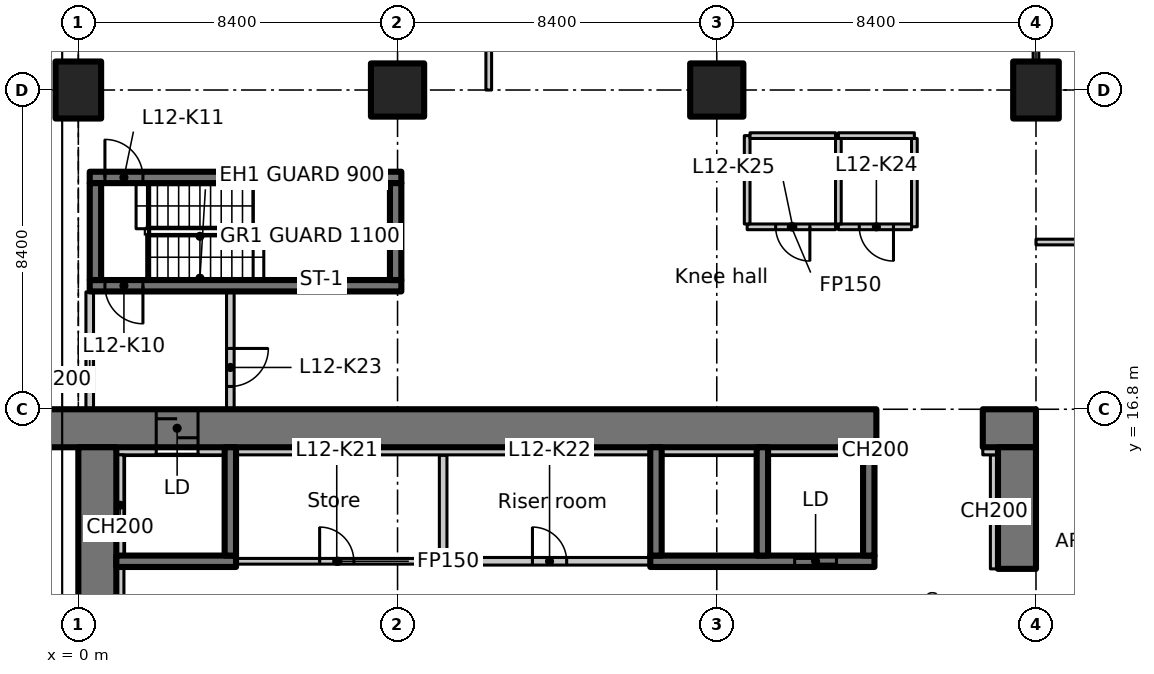
"""IFC4 building model, lengths in metres.
Left out: names, types, materials, properties, quantities, classifications, styles, units other than length and angle.
Written with IfcOpenShell. Run it as: python <this file> out.ifc"""

import sys

from ifc_helpers import new_model, si_unit, direction, frame, frame_2d, origin, origin_2d, place, context, subcontext, project, spatial, polyline, rectangle, outline, extrude, element, fill, save


model = new_model("IFC4")
c1 = context("Model", 3, precision=1e-05, world=origin(), true_north=direction((0.0, 1.0)))
c2 = subcontext(c1, "Body", "Model", "MODEL_VIEW")
j1 = project(units=[si_unit("LENGTHUNIT", "METRE"), si_unit("PLANEANGLEUNIT", "RADIAN")], contexts=[c1])
p1 = place(None, origin())
s1 = spatial("IfcSite", under=j1, at=p1, CompositionType="ELEMENT")
p2 = place(p1, origin())
s2 = spatial("IfcBuilding", under=s1, at=p2, CompositionType="ELEMENT")
p3 = place(p2, frame((0.0, 0.0, 58.1)))
s3 = spatial("IfcBuildingStorey", under=s2, at=p3, CompositionType="ELEMENT", Elevation=58.1)
p4 = place(p3, frame((0.0, 25.2, 0.0), z_axis=(0.0, 0.0, 1.0), x_axis=(1.0, 0.0, 0.0)))
e1 = element("IfcColumn", 1, at=p4, inside=s3, PredefinedType="COLUMN", context=c2, shape_type="SweptSolid", body=[
    extrude(rectangle(XDim=1.2, YDim=1.5, at=origin_2d()), origin(), (0.0, 0.0, 1.0), 3.35),
])
for number, where, z_axis, x_axis in (
    (2, (8.4, 25.2, 0.0), (0.0, 0.0, 1.0), (1.0, 0.0, 0.0)),
    (3, (16.8, 25.2, 0.0), (0.0, 0.0, 1.0), (1.0, 0.0, 0.0)),
):
    element("IfcColumn", number, at=place(p3, frame(where, z_axis=z_axis, x_axis=x_axis)), inside=s3, PredefinedType="COLUMN", context=c2, shape_type="SweptSolid", body=[
        extrude(rectangle(XDim=1.4, YDim=1.4, at=origin_2d()), origin(), (0.0, 0.0, 1.0), 3.35),
    ])
p5 = place(p3, frame((25.2, 25.2, 0.0), z_axis=(0.0, 0.0, 1.0), x_axis=(1.0, 0.0, 0.0)))
e4 = element("IfcColumn", 4, at=p5, inside=s3, PredefinedType="COLUMN", context=c2, shape_type="SweptSolid", body=[
    extrude(rectangle(XDim=1.2, YDim=1.5, at=origin_2d()), origin(), (0.0, 0.0, 1.0), 3.35),
])
p6 = place(p3, frame((-1.1, 16.3, 0.0), z_axis=(0.0, 0.0, 1.0), x_axis=(1.0, 0.0, 0.0)))
e5 = element("IfcWall", 5, at=p6, inside=s3, PredefinedType="SHEAR", context=c2, shape_type="SweptSolid", body=[
    extrude(rectangle(XDim=22.1, YDim=1.0, at=frame_2d((11.05, 0.0))), origin(), (0.0, 0.0, 1.0), 3.35),
])
p7 = place(p6, frame((3.15, 0.0, 0.0)))
e6 = element("IfcOpeningElement", 6, at=p7, cuts=e5, PredefinedType="OPENING", context=c2, shape_type="SweptSolid", body=[
    extrude(rectangle(XDim=1.1, YDim=2.3, at=frame_2d((0.55, 1.15))), frame((0.0, 0.51, 0.0), z_axis=(0.0, -1.0, 0.0), x_axis=(1.0, 0.0, 0.0)), (0.0, 0.0, 1.0), 1.02),
])
p8 = place(p3, frame((23.8, 16.3, 0.0), z_axis=(0.0, 0.0, 1.0), x_axis=(1.0, 0.0, 0.0)))
e7 = element("IfcWall", 7, at=p8, inside=s3, PredefinedType="SHEAR", context=c2, shape_type="SweptSolid", body=[
    extrude(rectangle(XDim=1.4, YDim=1.0, at=frame_2d((0.7, 0.0))), origin(), (0.0, 0.0, 1.0), 3.35),
])
p9 = place(p3, frame((0.5, 6.936, 0.0), z_axis=(0.0, 0.0, 1.0), x_axis=(0.0, 1.0, 0.0)))
e8 = element("IfcWall", 8, at=p9, inside=s3, PredefinedType="SHEAR", context=c2, shape_type="SweptSolid", body=[
    extrude(rectangle(XDim=8.864, YDim=1.0, at=frame_2d((4.432, 0.0))), origin(), (0.0, 0.0, 1.0), 3.35),
])
p10 = place(p3, frame((24.7, 12.6, 0.0), z_axis=(0.0, 0.0, 1.0), x_axis=(0.0, 1.0, 0.0)))
e9 = element("IfcWall", 9, at=p10, inside=s3, PredefinedType="SHEAR", context=c2, shape_type="SweptSolid", body=[
    extrude(rectangle(XDim=3.2, YDim=1.0, at=frame_2d((1.6, 0.0))), origin(), (0.0, 0.0, 1.0), 3.35),
])
p11 = place(p3, frame((24.1, 12.6, 0.0), z_axis=(0.0, 0.0, 1.0), x_axis=(0.0, 1.0, 0.0)))
e10 = element("IfcWall", 10, at=p11, inside=s3, PredefinedType="PARTITIONING", context=c2, shape_type="SweptSolid", body=[
    extrude(rectangle(XDim=3.0, YDim=0.2, at=frame_2d((1.5, 0.0))), origin(), (0.0, 0.0, 1.0), 3.35),
])
p12 = place(p3, frame((1.0, 15.7, 0.0), z_axis=(0.0, 0.0, 1.0), x_axis=(1.0, 0.0, 0.0)))
e11 = element("IfcWall", 11, at=p12, inside=s3, PredefinedType="PARTITIONING", context=c2, shape_type="SweptSolid", body=[
    extrude(rectangle(XDim=1.05, YDim=0.2, at=frame_2d((0.525, 0.0))), origin(), (0.0, 0.0, 1.0), 3.35),
])
p13 = place(p3, frame((23.8, 15.7, 0.0), z_axis=(0.0, 0.0, 1.0), x_axis=(1.0, 0.0, 0.0)))
e12 = element("IfcWall", 12, at=p13, inside=s3, PredefinedType="PARTITIONING", context=c2, shape_type="SweptSolid", body=[
    extrude(rectangle(XDim=0.4, YDim=0.2, at=frame_2d((0.2, 0.0))), origin(), (0.0, 0.0, 1.0), 3.35),
])
p14 = place(p3, frame((1.0, 12.8, 0.0), z_axis=(0.0, 0.0, 1.0), x_axis=(1.0, 0.0, 0.0)))
e13 = element("IfcWall", 13, at=p14, inside=s3, PredefinedType="SHEAR", context=c2, shape_type="SweptSolid", body=[
    extrude(rectangle(XDim=3.15, YDim=0.3, at=frame_2d((1.575, 0.0))), origin(), (0.0, 0.0, 1.0), 3.35),
])
p15 = place(p3, frame((4.0, 12.95, 0.0), z_axis=(0.0, 0.0, 1.0), x_axis=(0.0, 1.0, 0.0)))
e14 = element("IfcWall", 14, at=p15, inside=s3, PredefinedType="SHEAR", context=c2, shape_type="SweptSolid", body=[
    extrude(rectangle(XDim=2.85, YDim=0.3, at=frame_2d((1.425, 0.0))), origin(), (0.0, 0.0, 1.0), 3.35),
])
p16 = place(p3, frame((15.05, 12.8, 0.0), z_axis=(0.0, 0.0, 1.0), x_axis=(1.0, 0.0, 0.0)))
e15 = element("IfcWall", 15, at=p16, inside=s3, PredefinedType="SHEAR", context=c2, shape_type="SweptSolid", body=[
    extrude(rectangle(XDim=5.9, YDim=0.3, at=frame_2d((2.95, 0.0))), origin(), (0.0, 0.0, 1.0), 3.35),
])
p17 = place(p16, frame((3.8, 0.0, 0.0)))
e16 = element("IfcOpeningElement", 16, at=p17, cuts=e15, PredefinedType="OPENING", context=c2, shape_type="SweptSolid", body=[
    extrude(rectangle(XDim=1.1, YDim=2.3, at=frame_2d((0.55, 1.15))), frame((0.0, 0.16, 0.0), z_axis=(0.0, -1.0, 0.0), x_axis=(1.0, 0.0, 0.0)), (0.0, 0.0, 1.0), 0.32),
])
for number, where, z_axis, x_axis in (
    (17, (15.2, 12.95, 0.0), (0.0, 0.0, 1.0), (0.0, 1.0, 0.0)),
    (18, (18.0, 12.95, 0.0), (0.0, 0.0, 1.0), (0.0, 1.0, 0.0)),
    (19, (20.8, 12.95, 0.0), (0.0, 0.0, 1.0), (0.0, 1.0, 0.0)),
):
    element("IfcWall", number, at=place(p3, frame(where, z_axis=z_axis, x_axis=x_axis)), inside=s3, PredefinedType="SHEAR", context=c2, shape_type="SweptSolid", body=[
        extrude(rectangle(XDim=2.85, YDim=0.3, at=frame_2d((1.425, 0.0))), origin(), (0.0, 0.0, 1.0), 3.35),
    ])
p18 = place(p3, frame((8.5, 20.05, 0.0), z_axis=(0.0, 0.0, 1.0), x_axis=(-1.0, 0.0, 0.0)))
e20 = element("IfcWall", 20, at=p18, inside=s3, PredefinedType="SHEAR", context=c2, shape_type="SweptSolid", body=[
    extrude(rectangle(XDim=8.2, YDim=0.3, at=frame_2d((4.1, 0.0))), origin(), (0.0, 0.0, 1.0), 3.35),
])
p19 = place(p18, frame((6.8, 0.0, 0.0)))
e21 = element("IfcOpeningElement", 21, at=p19, cuts=e20, PredefinedType="OPENING", context=c2, shape_type="SweptSolid", body=[
    extrude(rectangle(XDim=1.0, YDim=2.1, at=frame_2d((0.5, 1.05))), frame((0.0, 0.16, 0.0), z_axis=(0.0, -1.0, 0.0), x_axis=(1.0, 0.0, 0.0)), (0.0, 0.0, 1.0), 0.32),
])
p20 = place(p3, frame((0.3, 22.9, 0.0), z_axis=(0.0, 0.0, 1.0), x_axis=(1.0, 0.0, 0.0)))
e22 = element("IfcWall", 22, at=p20, inside=s3, PredefinedType="SHEAR", context=c2, shape_type="SweptSolid", body=[
    extrude(rectangle(XDim=8.2, YDim=0.3, at=frame_2d((4.1, 0.0))), origin(), (0.0, 0.0, 1.0), 3.35),
])
p21 = place(p20, frame((0.4, 0.0, 0.0)))
e23 = element("IfcOpeningElement", 23, at=p21, cuts=e22, PredefinedType="OPENING", context=c2, shape_type="SweptSolid", body=[
    extrude(rectangle(XDim=1.0, YDim=2.1, at=frame_2d((0.5, 1.05))), frame((0.0, 0.16, 0.0), z_axis=(0.0, -1.0, 0.0), x_axis=(1.0, 0.0, 0.0)), (0.0, 0.0, 1.0), 0.32),
])
for number, where, z_axis, x_axis in (
    (24, (0.45, 20.2, 0.0), (0.0, 0.0, 1.0), (0.0, 1.0, 0.0)),
    (25, (8.35, 20.2, 0.0), (0.0, 0.0, 1.0), (0.0, 1.0, 0.0)),
):
    element("IfcWall", number, at=place(p3, frame(where, z_axis=z_axis, x_axis=x_axis)), inside=s3, PredefinedType="SHEAR", context=c2, shape_type="SweptSolid", body=[
        extrude(rectangle(XDim=2.55, YDim=0.3, at=frame_2d((1.275, 0.0))), origin(), (0.0, 0.0, 1.0), 3.35),
    ])
p22 = place(p3, frame((0.3, 16.812, 0.0), z_axis=(0.0, 0.0, 1.0), x_axis=(0.0, 1.0, 0.0)))
e26 = element("IfcWall", 26, at=p22, inside=s3, PredefinedType="PARTITIONING", context=c2, shape_type="SweptSolid", body=[
    extrude(rectangle(XDim=3.076, YDim=0.2, at=frame_2d((1.538, 0.0))), origin(), (0.0, 0.0, 1.0), 2.98),
])
p23 = place(p3, frame((4.0, 19.888, 0.0), z_axis=(0.0, 0.0, 1.0), x_axis=(0.0, -1.0, 0.0)))
e27 = element("IfcWall", 27, at=p23, inside=s3, PredefinedType="PARTITIONING", context=c2, shape_type="SweptSolid", body=[
    extrude(rectangle(XDim=3.076, YDim=0.2, at=frame_2d((1.538, 0.0))), origin(), (0.0, 0.0, 1.0), 3.35),
])
p24 = place(p23, frame((1.488, 0.0, 0.0)))
e28 = element("IfcOpeningElement", 28, at=p24, cuts=e27, PredefinedType="OPENING", context=c2, shape_type="SweptSolid", body=[
    extrude(rectangle(XDim=1.0, YDim=2.1, at=frame_2d((0.5, 1.05))), frame((0.0, 0.11, 0.0), z_axis=(0.0, -1.0, 0.0), x_axis=(1.0, 0.0, 0.0)), (0.0, 0.0, 1.0), 0.22),
])
p25 = place(p3, frame((9.6, 15.588, 0.0), z_axis=(0.0, 0.0, 1.0), x_axis=(0.0, -1.0, 0.0)))
e29 = element("IfcWall", 29, at=p25, inside=s3, PredefinedType="PARTITIONING", context=c2, shape_type="SweptSolid", body=[
    extrude(rectangle(XDim=2.788, YDim=0.2, at=frame_2d((1.394, 0.0))), origin(), (0.0, 0.0, 1.0), 3.35),
])
p26 = place(p3, frame((9.7, 12.8, 0.0), z_axis=(0.0, 0.0, 1.0), x_axis=(1.0, 0.0, 0.0)))
e30 = element("IfcWall", 30, at=p26, inside=s3, PredefinedType="PARTITIONING", context=c2, shape_type="SweptSolid", body=[
    extrude(rectangle(XDim=5.338, YDim=0.2, at=frame_2d((2.669, 0.0))), origin(), (0.0, 0.0, 1.0), 3.35),
])
p27 = place(p26, frame((2.25, 0.0, 0.0)))
e31 = element("IfcOpeningElement", 31, at=p27, cuts=e30, PredefinedType="OPENING", context=c2, shape_type="SweptSolid", body=[
    extrude(rectangle(XDim=0.9, YDim=2.1, at=frame_2d((0.45, 1.05))), frame((0.0, 0.11, 0.0), z_axis=(0.0, -1.0, 0.0), x_axis=(1.0, 0.0, 0.0)), (0.0, 0.0, 1.0), 0.22),
])
p28 = place(p3, frame((4.162, 12.8, 0.0), z_axis=(0.0, 0.0, 1.0), x_axis=(1.0, 0.0, 0.0)))
e32 = element("IfcWall", 32, at=p28, inside=s3, PredefinedType="PARTITIONING", context=c2, shape_type="SweptSolid", body=[
    extrude(rectangle(XDim=5.338, YDim=0.15, at=frame_2d((2.669, 0.0))), origin(), (0.0, 0.0, 1.0), 3.35),
])
p29 = place(p28, frame((2.188, 0.0, 0.0)))
e33 = element("IfcOpeningElement", 33, at=p29, cuts=e32, PredefinedType="OPENING", context=c2, shape_type="SweptSolid", body=[
    extrude(rectangle(XDim=0.9, YDim=2.1, at=frame_2d((0.45, 1.05))), frame((0.0, 0.085, 0.0), z_axis=(0.0, -1.0, 0.0), x_axis=(1.0, 0.0, 0.0)), (0.0, 0.0, 1.0), 0.17),
])
p30 = place(p3, frame((20.0, 24.0, 0.0), z_axis=(0.0, 0.0, 1.0), x_axis=(1.0, 0.0, 0.0)))
e34 = element("IfcWall", 34, at=p30, inside=s3, PredefinedType="PARTITIONING", context=c2, shape_type="SweptSolid", body=[
    extrude(rectangle(XDim=2.0, YDim=0.15, at=frame_2d((1.0, 0.0))), origin(), (0.0, 0.0, 1.0), 3.35),
])
p31 = place(p3, frame((22.0, 23.925, 0.0), z_axis=(0.0, 0.0, 1.0), x_axis=(0.0, -1.0, 0.0)))
e35 = element("IfcWall", 35, at=p31, inside=s3, PredefinedType="PARTITIONING", context=c2, shape_type="SweptSolid", body=[
    extrude(rectangle(XDim=2.325, YDim=0.15, at=frame_2d((1.163, 0.0))), origin(), (0.0, 0.0, 1.0), 3.35),
])
p32 = place(p3, frame((21.925, 21.6, 0.0), z_axis=(0.0, 0.0, 1.0), x_axis=(-1.0, 0.0, 0.0)))
e36 = element("IfcWall", 36, at=p32, inside=s3, PredefinedType="PARTITIONING", context=c2, shape_type="SweptSolid", body=[
    extrude(rectangle(XDim=1.925, YDim=0.15, at=frame_2d((0.962, 0.0))), origin(), (0.0, 0.0, 1.0), 3.35),
])
p33 = place(p32, frame((0.475, 0.0, 0.0)))
e37 = element("IfcOpeningElement", 37, at=p33, cuts=e36, PredefinedType="OPENING", context=c2, shape_type="SweptSolid", body=[
    extrude(rectangle(XDim=0.9, YDim=2.1, at=frame_2d((0.45, 1.05))), frame((0.0, 0.085, 0.0), z_axis=(0.0, -1.0, 0.0), x_axis=(1.0, 0.0, 0.0)), (0.0, 0.0, 1.0), 0.17),
])
p34 = place(p3, frame((20.0, 21.675, 0.0), z_axis=(0.0, 0.0, 1.0), x_axis=(0.0, 1.0, 0.0)))
e38 = element("IfcWall", 38, at=p34, inside=s3, PredefinedType="PARTITIONING", context=c2, shape_type="SweptSolid", body=[
    extrude(rectangle(XDim=2.25, YDim=0.15, at=frame_2d((1.125, 0.0))), origin(), (0.0, 0.0, 1.0), 3.35),
])
p35 = place(p3, frame((19.925, 21.6, 0.0), z_axis=(0.0, 0.0, 1.0), x_axis=(-1.0, 0.0, 0.0)))
e39 = element("IfcWall", 39, at=p35, inside=s3, PredefinedType="PARTITIONING", context=c2, shape_type="SweptSolid", body=[
    extrude(rectangle(XDim=2.325, YDim=0.15, at=frame_2d((1.163, 0.0))), origin(), (0.0, 0.0, 1.0), 3.35),
])
p36 = place(p35, frame((0.675, 0.0, 0.0)))
e40 = element("IfcOpeningElement", 40, at=p36, cuts=e39, PredefinedType="OPENING", context=c2, shape_type="SweptSolid", body=[
    extrude(rectangle(XDim=0.9, YDim=2.1, at=frame_2d((0.45, 1.05))), frame((0.0, 0.085, 0.0), z_axis=(0.0, -1.0, 0.0), x_axis=(1.0, 0.0, 0.0)), (0.0, 0.0, 1.0), 0.17),
])
p37 = place(p3, frame((17.6, 21.675, 0.0), z_axis=(0.0, 0.0, 1.0), x_axis=(0.0, 1.0, 0.0)))
e41 = element("IfcWall", 41, at=p37, inside=s3, PredefinedType="PARTITIONING", context=c2, shape_type="SweptSolid", body=[
    extrude(rectangle(XDim=2.325, YDim=0.15, at=frame_2d((1.163, 0.0))), origin(), (0.0, 0.0, 1.0), 3.35),
])
p38 = place(p3, frame((17.675, 24.0, 0.0), z_axis=(0.0, 0.0, 1.0), x_axis=(1.0, 0.0, 0.0)))
e42 = element("IfcWall", 42, at=p38, inside=s3, PredefinedType="PARTITIONING", context=c2, shape_type="SweptSolid", body=[
    extrude(rectangle(XDim=2.25, YDim=0.15, at=frame_2d((1.125, 0.0))), origin(), (0.0, 0.0, 1.0), 3.35),
])
p39 = place(p3, frame((1.1, 9.75, 0.0), z_axis=(0.0, 0.0, 1.0), x_axis=(0.0, 1.0, 0.0)))
e43 = element("IfcWall", 43, at=p39, inside=s3, PredefinedType="PARTITIONING", context=c2, shape_type="SweptSolid", body=[
    extrude(rectangle(XDim=2.9, YDim=0.2, at=frame_2d((1.45, 0.0))), origin(), (0.0, 0.0, 1.0), 3.35),
])
p40 = place(p3, frame((1.1, 12.95, 0.0), z_axis=(0.0, 0.0, 1.0), x_axis=(0.0, 1.0, 0.0)))
e44 = element("IfcWall", 44, at=p40, inside=s3, PredefinedType="PARTITIONING", context=c2, shape_type="SweptSolid", body=[
    extrude(rectangle(XDim=2.65, YDim=0.2, at=frame_2d((1.325, 0.0))), origin(), (0.0, 0.0, 1.0), 3.35),
])
p41 = place(p3, frame((3.15, 15.7, 0.0), z_axis=(0.0, 0.0, 1.0), x_axis=(1.0, 0.0, 0.0)))
e45 = element("IfcWall", 45, at=p41, inside=s3, PredefinedType="PARTITIONING", context=c2, shape_type="SweptSolid", body=[
    extrude(rectangle(XDim=0.7, YDim=0.2, at=frame_2d((0.35, 0.0))), origin(), (0.0, 0.0, 1.0), 3.35),
])
p42 = place(p3, frame((4.15, 15.7, 0.0), z_axis=(0.0, 0.0, 1.0), x_axis=(1.0, 0.0, 0.0)))
e46 = element("IfcWall", 46, at=p42, inside=s3, PredefinedType="PARTITIONING", context=c2, shape_type="SweptSolid", body=[
    extrude(rectangle(XDim=10.9, YDim=0.2, at=frame_2d((5.45, 0.0))), origin(), (0.0, 0.0, 1.0), 3.35),
])
for number, where, z_axis, x_axis in (
    (47, (15.35, 15.7, 0.0), (0.0, 0.0, 1.0), (1.0, 0.0, 0.0)),
    (48, (18.15, 15.7, 0.0), (0.0, 0.0, 1.0), (1.0, 0.0, 0.0)),
):
    element("IfcWall", number, at=place(p3, frame(where, z_axis=z_axis, x_axis=x_axis)), inside=s3, PredefinedType="PARTITIONING", context=c2, shape_type="SweptSolid", body=[
        extrude(rectangle(XDim=2.5, YDim=0.2, at=frame_2d((1.25, 0.0))), origin(), (0.0, 0.0, 1.0), 3.35),
    ])
p43 = place(p3, frame((20.95, 15.7, 0.0), z_axis=(0.0, 0.0, 1.0), x_axis=(1.0, 0.0, 0.0)))
e49 = element("IfcWall", 49, at=p43, inside=s3, PredefinedType="PARTITIONING", context=c2, shape_type="SweptSolid", body=[
    extrude(rectangle(XDim=0.05, YDim=0.2, at=frame_2d((0.025, 0.0))), origin(), (0.0, 0.0, 1.0), 3.35),
])
p44 = place(p3, frame((25.2, 21.2, 0.0), z_axis=(0.0, 0.0, 1.0), x_axis=(1.0, 0.0, 0.0)))
e50 = element("IfcWall", 50, at=p44, inside=s3, PredefinedType="PARTITIONING", context=c2, shape_type="SweptSolid", body=[
    extrude(rectangle(XDim=4.2, YDim=0.15, at=frame_2d((2.1, 0.0))), origin(), (0.0, 0.0, 1.0), 3.33),
])
p45 = place(p3, frame((25.2, 31.0, 0.0), z_axis=(0.0, 0.0, 1.0), x_axis=(0.0, -1.0, 0.0)))
e51 = element("IfcWall", 51, at=p45, inside=s3, PredefinedType="PARTITIONING", context=c2, shape_type="SweptSolid", body=[
    extrude(outline(polyline([(0.0, 0.0), (5.03, 0.0), (5.03, 2.98), (0.0, 2.98), (0.0, 0.0)])), frame((0.0, 0.075, 0.0), z_axis=(0.0, -1.0, 0.0), x_axis=(1.0, 0.0, 0.0)), (0.0, 0.0, 1.0), 0.15),
])
p46 = place(p45, frame((1.83, 0.0, 0.0)))
e52 = element("IfcOpeningElement", 52, at=p46, cuts=e51, PredefinedType="OPENING", context=c2, shape_type="SweptSolid", body=[
    extrude(rectangle(XDim=1.1, YDim=2.1, at=frame_2d((0.55, 1.05))), frame((0.0, 0.085, 0.0), z_axis=(0.0, -1.0, 0.0), x_axis=(1.0, 0.0, 0.0)), (0.0, 0.0, 1.0), 0.17),
])
p47 = place(p3, frame((10.8, 25.2, 0.0), z_axis=(0.0, 0.0, 1.0), x_axis=(0.0, 1.0, 0.0)))
e53 = element("IfcWall", 53, at=p47, inside=s3, PredefinedType="PARTITIONING", context=c2, shape_type="SweptSolid", body=[
    extrude(rectangle(XDim=8.4, YDim=0.15, at=frame_2d((4.2, 0.0))), origin(), (0.0, 0.0, 1.0), 3.33),
])
p48 = place(p47, frame((3.3, 0.0, 0.0)))
e54 = element("IfcOpeningElement", 54, at=p48, cuts=e53, PredefinedType="OPENING", context=c2, shape_type="SweptSolid", body=[
    extrude(rectangle(XDim=1.6, YDim=2.1, at=frame_2d((0.8, 1.05))), frame((0.0, 0.085, 0.0), z_axis=(0.0, -1.0, 0.0), x_axis=(1.0, 0.0, 0.0)), (0.0, 0.0, 1.0), 0.17),
])
p49 = place(p7, origin())
e55 = element("IfcDoor", 55, at=p49, inside=s3, OperationType="SLIDING_TO_LEFT", PredefinedType="DOOR", context=c2, shape_type="SweptSolid", body=[
    extrude(rectangle(XDim=1.1, YDim=2.3, at=frame_2d((0.55, 1.15))), frame((0.0, 0.025, 0.0), z_axis=(0.0, -1.0, 0.0), x_axis=(1.0, 0.0, 0.0)), (0.0, 0.0, 1.0), 0.05),
])
fill(e6, e55)
p50 = place(p17, origin())
e56 = element("IfcDoor", 56, at=p50, inside=s3, OperationType="SLIDING_TO_LEFT", PredefinedType="DOOR", context=c2, shape_type="SweptSolid", body=[
    extrude(rectangle(XDim=1.1, YDim=2.3, at=frame_2d((0.55, 1.15))), frame((0.0, 0.025, 0.0), z_axis=(0.0, -1.0, 0.0), x_axis=(1.0, 0.0, 0.0)), (0.0, 0.0, 1.0), 0.05),
])
fill(e16, e56)
p51 = place(p19, origin())
e57 = element("IfcDoor", 57, at=p51, inside=s3, OperationType="SINGLE_SWING_LEFT", PredefinedType="DOOR", context=c2, shape_type="SweptSolid", body=[
    extrude(rectangle(XDim=1.0, YDim=2.1, at=frame_2d((0.5, 1.05))), frame((0.0, 0.025, 0.0), z_axis=(0.0, -1.0, 0.0), x_axis=(1.0, 0.0, 0.0)), (0.0, 0.0, 1.0), 0.05),
])
fill(e21, e57)
p52 = place(p21, origin())
e58 = element("IfcDoor", 58, at=p52, inside=s3, OperationType="SINGLE_SWING_RIGHT", PredefinedType="DOOR", context=c2, shape_type="SweptSolid", body=[
    extrude(rectangle(XDim=1.0, YDim=2.1, at=frame_2d((0.5, 1.05))), frame((0.0, 0.025, 0.0), z_axis=(0.0, -1.0, 0.0), x_axis=(1.0, 0.0, 0.0)), (0.0, 0.0, 1.0), 0.05),
])
fill(e23, e58)
p53 = place(p29, origin())
e59 = element("IfcDoor", 59, at=p53, inside=s3, OperationType="SINGLE_SWING_RIGHT", PredefinedType="DOOR", context=c2, shape_type="SweptSolid", body=[
    extrude(rectangle(XDim=0.9, YDim=2.1, at=frame_2d((0.45, 1.05))), frame((0.0, 0.025, 0.0), z_axis=(0.0, -1.0, 0.0), x_axis=(1.0, 0.0, 0.0)), (0.0, 0.0, 1.0), 0.05),
])
fill(e33, e59)
p54 = place(p27, origin())
e60 = element("IfcDoor", 60, at=p54, inside=s3, OperationType="SINGLE_SWING_LEFT", PredefinedType="DOOR", context=c2, shape_type="SweptSolid", body=[
    extrude(rectangle(XDim=0.9, YDim=2.1, at=frame_2d((0.45, 1.05))), frame((0.0, 0.025, 0.0), z_axis=(0.0, -1.0, 0.0), x_axis=(1.0, 0.0, 0.0)), (0.0, 0.0, 1.0), 0.05),
])
fill(e31, e60)
p55 = place(p24, origin())
e61 = element("IfcDoor", 61, at=p55, inside=s3, OperationType="SINGLE_SWING_RIGHT", PredefinedType="DOOR", context=c2, shape_type="SweptSolid", body=[
    extrude(rectangle(XDim=1.0, YDim=2.1, at=frame_2d((0.5, 1.05))), frame((0.0, 0.025, 0.0), z_axis=(0.0, -1.0, 0.0), x_axis=(1.0, 0.0, 0.0)), (0.0, 0.0, 1.0), 0.05),
])
fill(e28, e61)
p56 = place(p33, origin())
e62 = element("IfcDoor", 62, at=p56, inside=s3, OperationType="SINGLE_SWING_LEFT", PredefinedType="DOOR", context=c2, shape_type="SweptSolid", body=[
    extrude(rectangle(XDim=0.9, YDim=2.1, at=frame_2d((0.45, 1.05))), frame((0.0, 0.025, 0.0), z_axis=(0.0, -1.0, 0.0), x_axis=(1.0, 0.0, 0.0)), (0.0, 0.0, 1.0), 0.05),
])
fill(e37, e62)
p57 = place(p36, origin())
e63 = element("IfcDoor", 63, at=p57, inside=s3, OperationType="SINGLE_SWING_RIGHT", PredefinedType="DOOR", context=c2, shape_type="SweptSolid", body=[
    extrude(rectangle(XDim=0.9, YDim=2.1, at=frame_2d((0.45, 1.05))), frame((0.0, 0.025, 0.0), z_axis=(0.0, -1.0, 0.0), x_axis=(1.0, 0.0, 0.0)), (0.0, 0.0, 1.0), 0.05),
])
fill(e40, e63)
save(model, sys.argv[1])
